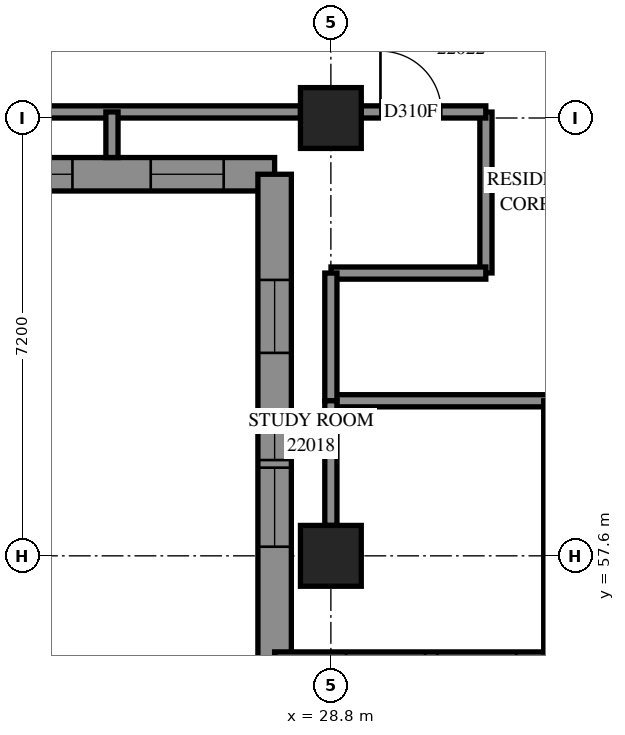
"""IFC4 building model, lengths in metres.
Left out: names, types, materials, properties, quantities, classifications, styles, units other than length and angle.
Written with IfcOpenShell. Run it as: python <this file> out.ifc"""

import sys

from ifc_helpers import new_model, si_unit, direction, frame, frame_2d, origin, origin_2d, place, context, subcontext, project, spatial, polyline, rectangle, outline, extrude, element, fill, save


model = new_model("IFC4")
c1 = context("Model", 3, precision=1e-05, world=origin(), true_north=direction((0.0, 1.0)))
c2 = subcontext(c1, "Body", "Model", "MODEL_VIEW")
j1 = project(units=[si_unit("LENGTHUNIT", "METRE"), si_unit("PLANEANGLEUNIT", "RADIAN")], contexts=[c1])
p1 = place(None, origin())
s1 = spatial("IfcSite", under=j1, at=p1, CompositionType="ELEMENT")
p2 = place(p1, origin())
s2 = spatial("IfcBuilding", under=s1, at=p2, CompositionType="ELEMENT")
p3 = place(p2, frame((0.0, 0.0, 84.6)))
s3 = spatial("IfcBuildingStorey", under=s2, at=p3, CompositionType="ELEMENT", Elevation=84.6)
for number, where, z_axis, x_axis in (
    (1, (28.8, 57.6, 0.0), (0.0, 0.0, 1.0), (1.0, 0.0, 0.0)),
    (2, (28.8, 64.8, 0.0), (0.0, 0.0, 1.0), (1.0, 0.0, 0.0)),
):
    element("IfcColumn", number, at=place(p3, frame(where, z_axis=z_axis, x_axis=x_axis)), inside=s3, PredefinedType="COLUMN", context=c2, shape_type="SweptSolid", body=[
        extrude(rectangle(XDim=1.0, YDim=1.0, at=origin_2d()), origin(), (0.0, 0.0, 1.0), 3.1),
    ])
p4 = place(p3, frame((19.745, 63.875, 0.0), z_axis=(0.0, 0.0, 1.0), x_axis=(1.0, 0.0, 0.0)))
e3 = element("IfcWall", 3, at=p4, inside=s3, PredefinedType="SOLIDWALL", context=c2, shape_type="SweptSolid", body=[
    extrude(outline(polyline([(-0.275, -0.275), (7.855, -0.275), (8.405, 0.275), (0.275, 0.275), (-0.275, -0.275)])), origin(), (0.0, 0.0, 1.0), 3.1),
])
p5 = place(p4, frame((2.005, 0.0, 0.5)))
e4 = element("IfcOpeningElement", 4, at=p5, cuts=e3, PredefinedType="OPENING", context=c2, shape_type="SweptSolid", body=[
    extrude(rectangle(XDim=1.3, YDim=2.45, at=frame_2d((0.65, 1.225))), frame((0.0, 0.285, 0.0), z_axis=(0.0, -1.0, 0.0), x_axis=(1.0, 0.0, 0.0)), (0.0, 0.0, 1.0), 0.57),
])
p6 = place(p4, frame((3.505, 0.0, 0.5)))
e5 = element("IfcOpeningElement", 5, at=p6, cuts=e3, PredefinedType="OPENING", context=c2, shape_type="SweptSolid", body=[
    extrude(rectangle(XDim=1.3, YDim=2.45, at=frame_2d((0.65, 1.225))), frame((0.0, 0.285, 0.0), z_axis=(0.0, -1.0, 0.0), x_axis=(1.0, 0.0, 0.0)), (0.0, 0.0, 1.0), 0.57),
])
p7 = place(p4, frame((6.093, 0.0, 0.5)))
e6 = element("IfcOpeningElement", 6, at=p7, cuts=e3, PredefinedType="OPENING", context=c2, shape_type="SweptSolid", body=[
    extrude(rectangle(XDim=1.2, YDim=2.45, at=frame_2d((0.6, 1.225))), frame((0.0, 0.285, 0.0), z_axis=(0.0, -1.0, 0.0), x_axis=(1.0, 0.0, 0.0)), (0.0, 0.0, 1.0), 0.57),
])
p8 = place(p3, frame((27.875, 63.875, 0.0), z_axis=(0.0, 0.0, 1.0), x_axis=(0.0, -1.0, 0.0)))
e7 = element("IfcWall", 7, at=p8, inside=s3, PredefinedType="SOLIDWALL", context=c2, shape_type="SweptSolid", body=[
    extrude(outline(polyline([(0.275, -0.275), (8.405, -0.275), (7.855, 0.275), (-0.275, 0.275), (0.275, -0.275)])), origin(), (0.0, 0.0, 1.0), 3.1),
])
p9 = place(p8, frame((4.825, 0.0, 0.5)))
e8 = element("IfcOpeningElement", 8, at=p9, cuts=e7, PredefinedType="OPENING", context=c2, shape_type="SweptSolid", body=[
    extrude(rectangle(XDim=1.3, YDim=2.45, at=frame_2d((0.65, 1.225))), frame((0.0, 0.285, 0.0), z_axis=(0.0, -1.0, 0.0), x_axis=(1.0, 0.0, 0.0)), (0.0, 0.0, 1.0), 0.57),
])
p10 = place(p8, frame((1.738, 0.0, 0.5)))
e9 = element("IfcOpeningElement", 9, at=p10, cuts=e7, PredefinedType="OPENING", context=c2, shape_type="SweptSolid", body=[
    extrude(rectangle(XDim=1.2, YDim=2.45, at=frame_2d((0.6, 1.225))), frame((0.0, 0.285, 0.0), z_axis=(0.0, -1.0, 0.0), x_axis=(1.0, 0.0, 0.0)), (0.0, 0.0, 1.0), 0.57),
])
p11 = place(p8, frame((3.9, 0.0, 0.45)))
e10 = element("IfcOpeningElement", 10, at=p11, cuts=e7, PredefinedType="OPENING", context=c2, shape_type="SweptSolid", body=[
    extrude(rectangle(XDim=0.8, YDim=2.5, at=frame_2d((0.4, 1.25))), frame((0.0, 0.285, 0.0), z_axis=(0.0, -1.0, 0.0), x_axis=(1.0, 0.0, 0.0)), (0.0, 0.0, 1.0), 0.57),
])
p12 = place(p3, frame((27.875, 55.745, 0.0), z_axis=(0.0, 0.0, 1.0), x_axis=(1.0, 0.0, 0.0)))
e11 = element("IfcWall", 11, at=p12, inside=s3, PredefinedType="SOLIDWALL", context=c2, shape_type="SweptSolid", body=[
    extrude(outline(polyline([(-0.275, -0.275), (14.125, -0.275), (14.675, 0.275), (0.275, 0.275), (-0.275, -0.275)])), origin(), (0.0, 0.0, 1.0), 3.1),
])
p13 = place(p12, frame((1.175, 0.0, 0.5)))
e12 = element("IfcOpeningElement", 12, at=p13, cuts=e11, PredefinedType="OPENING", context=c2, shape_type="SweptSolid", body=[
    extrude(rectangle(XDim=1.3, YDim=2.45, at=frame_2d((0.65, 1.225))), frame((0.0, 0.285, 0.0), z_axis=(0.0, -1.0, 0.0), x_axis=(1.0, 0.0, 0.0)), (0.0, 0.0, 1.0), 0.57),
])
p14 = place(p12, frame((2.675, 0.0, 0.5)))
e13 = element("IfcOpeningElement", 13, at=p14, cuts=e11, PredefinedType="OPENING", context=c2, shape_type="SweptSolid", body=[
    extrude(rectangle(XDim=1.3, YDim=2.45, at=frame_2d((0.65, 1.225))), frame((0.0, 0.285, 0.0), z_axis=(0.0, -1.0, 0.0), x_axis=(1.0, 0.0, 0.0)), (0.0, 0.0, 1.0), 0.57),
])
p15 = place(p12, frame((4.925, 0.0, 0.5)))
e14 = element("IfcOpeningElement", 14, at=p15, cuts=e11, PredefinedType="OPENING", context=c2, shape_type="SweptSolid", body=[
    extrude(rectangle(XDim=1.3, YDim=2.45, at=frame_2d((0.65, 1.225))), frame((0.0, 0.285, 0.0), z_axis=(0.0, -1.0, 0.0), x_axis=(1.0, 0.0, 0.0)), (0.0, 0.0, 1.0), 0.57),
])
p16 = place(p12, frame((6.425, 0.0, 0.5)))
e15 = element("IfcOpeningElement", 15, at=p16, cuts=e11, PredefinedType="OPENING", context=c2, shape_type="SweptSolid", body=[
    extrude(rectangle(XDim=1.3, YDim=2.45, at=frame_2d((0.65, 1.225))), frame((0.0, 0.285, 0.0), z_axis=(0.0, -1.0, 0.0), x_axis=(1.0, 0.0, 0.0)), (0.0, 0.0, 1.0), 0.57),
])
p17 = place(p12, frame((8.275, 0.0, 0.5)))
e16 = element("IfcOpeningElement", 16, at=p17, cuts=e11, PredefinedType="OPENING", context=c2, shape_type="SweptSolid", body=[
    extrude(rectangle(XDim=1.3, YDim=2.45, at=frame_2d((0.65, 1.225))), frame((0.0, 0.285, 0.0), z_axis=(0.0, -1.0, 0.0), x_axis=(1.0, 0.0, 0.0)), (0.0, 0.0, 1.0), 0.57),
])
p18 = place(p12, frame((9.775, 0.0, 0.5)))
e17 = element("IfcOpeningElement", 17, at=p18, cuts=e11, PredefinedType="OPENING", context=c2, shape_type="SweptSolid", body=[
    extrude(rectangle(XDim=1.3, YDim=2.45, at=frame_2d((0.65, 1.225))), frame((0.0, 0.285, 0.0), z_axis=(0.0, -1.0, 0.0), x_axis=(1.0, 0.0, 0.0)), (0.0, 0.0, 1.0), 0.57),
])
p19 = place(p12, frame((12.363, 0.0, 0.5)))
e18 = element("IfcOpeningElement", 18, at=p19, cuts=e11, PredefinedType="OPENING", context=c2, shape_type="SweptSolid", body=[
    extrude(rectangle(XDim=1.2, YDim=2.45, at=frame_2d((0.6, 1.225))), frame((0.0, 0.285, 0.0), z_axis=(0.0, -1.0, 0.0), x_axis=(1.0, 0.0, 0.0)), (0.0, 0.0, 1.0), 0.57),
])
p20 = place(p3, frame((28.8, 60.15, 0.0), z_axis=(0.0, 0.0, 1.0), x_axis=(1.0, 0.0, 0.0)))
e19 = element("IfcWall", 19, at=p20, inside=s3, PredefinedType="PARTITIONING", context=c2, shape_type="SweptSolid", body=[
    extrude(rectangle(XDim=24.15, YDim=0.2, at=frame_2d((12.075, 0.0))), origin(), (0.0, 0.0, 1.0), 3.1),
])
p21 = place(p20, frame((11.325, 0.0, 0.0)))
e20 = element("IfcOpeningElement", 20, at=p21, cuts=e19, PredefinedType="OPENING", context=c2, shape_type="SweptSolid", body=[
    extrude(rectangle(XDim=1.0, YDim=2.1, at=frame_2d((0.5, 1.05))), frame((0.0, 0.11, 0.0), z_axis=(0.0, -1.0, 0.0), x_axis=(1.0, 0.0, 0.0)), (0.0, 0.0, 1.0), 0.22),
])
p22 = place(p20, frame((14.8, 0.0, 0.0)))
e21 = element("IfcOpeningElement", 21, at=p22, cuts=e19, PredefinedType="OPENING", context=c2, shape_type="SweptSolid", body=[
    extrude(rectangle(XDim=0.9, YDim=2.1, at=frame_2d((0.45, 1.05))), frame((0.0, 0.11, 0.0), z_axis=(0.0, -1.0, 0.0), x_axis=(1.0, 0.0, 0.0)), (0.0, 0.0, 1.0), 0.22),
])
p23 = place(p20, frame((18.508, 0.0, 0.0)))
e22 = element("IfcOpeningElement", 22, at=p23, cuts=e19, PredefinedType="OPENING", context=c2, shape_type="SweptSolid", body=[
    extrude(rectangle(XDim=1.0, YDim=2.1, at=frame_2d((0.5, 1.05))), frame((0.0, 0.11, 0.0), z_axis=(0.0, -1.0, 0.0), x_axis=(1.0, 0.0, 0.0)), (0.0, 0.0, 1.0), 0.22),
])
p24 = place(p20, frame((22.882, 0.0, 0.0)))
e23 = element("IfcOpeningElement", 23, at=p24, cuts=e19, PredefinedType="OPENING", context=c2, shape_type="SweptSolid", body=[
    extrude(rectangle(XDim=1.0, YDim=2.1, at=frame_2d((0.5, 1.05))), frame((0.0, 0.11, 0.0), z_axis=(0.0, -1.0, 0.0), x_axis=(1.0, 0.0, 0.0)), (0.0, 0.0, 1.0), 0.22),
])
p25 = place(p3, frame((22.1, 64.9, 0.0), z_axis=(0.0, 0.0, 1.0), x_axis=(1.0, 0.0, 0.0)))
e24 = element("IfcWall", 24, at=p25, inside=s3, PredefinedType="PARTITIONING", context=c2, shape_type="SweptSolid", body=[
    extrude(rectangle(XDim=6.2, YDim=0.2, at=frame_2d((3.1, 0.0))), origin(), (0.0, 0.0, 1.0), 2.6),
])
p26 = place(p3, frame((32.4, 56.02, 0.0), z_axis=(0.0, 0.0, 1.0), x_axis=(0.0, 1.0, 0.0)))
e25 = element("IfcWall", 25, at=p26, inside=s3, PredefinedType="PARTITIONING", context=c2, shape_type="SweptSolid", body=[
    extrude(rectangle(XDim=4.13, YDim=0.2, at=frame_2d((2.065, 0.0))), origin(), (0.0, 0.0, 1.0), 3.1),
])
p27 = place(p3, frame((31.35, 62.252, 0.0), z_axis=(0.0, 0.0, 1.0), x_axis=(0.0, 1.0, 0.0)))
e26 = element("IfcWall", 26, at=p27, inside=s3, PredefinedType="PARTITIONING", context=c2, shape_type="SweptSolid", body=[
    extrude(rectangle(XDim=2.646, YDim=0.2, at=frame_2d((1.323, 0.0))), origin(), (0.0, 0.0, 1.0), 3.1),
])
p28 = place(p3, frame((28.802, 62.25, 0.0), z_axis=(0.0, 0.0, 1.0), x_axis=(1.0, 0.0, 0.0)))
e27 = element("IfcWall", 27, at=p28, inside=s3, PredefinedType="PARTITIONING", context=c2, shape_type="SweptSolid", body=[
    extrude(rectangle(XDim=2.546, YDim=0.2, at=frame_2d((1.273, 0.0))), origin(), (0.0, 0.0, 1.0), 3.1),
])
p29 = place(p3, frame((28.8, 60.15, 0.0), z_axis=(0.0, 0.0, 1.0), x_axis=(0.0, 1.0, 0.0)))
e28 = element("IfcWall", 28, at=p29, inside=s3, PredefinedType="PARTITIONING", context=c2, shape_type="SweptSolid", body=[
    extrude(rectangle(XDim=2.1, YDim=0.2, at=frame_2d((1.05, 0.0))), origin(), (0.0, 0.0, 1.0), 2.6),
])
p30 = place(p3, frame((28.8, 58.1, 0.0), z_axis=(0.0, 0.0, 1.0), x_axis=(0.0, 1.0, 0.0)))
e29 = element("IfcWall", 29, at=p30, inside=s3, PredefinedType="PARTITIONING", context=c2, shape_type="SweptSolid", body=[
    extrude(rectangle(XDim=2.05, YDim=0.2, at=frame_2d((1.025, 0.0))), origin(), (0.0, 0.0, 1.0), 2.6),
])
p31 = place(p3, frame((29.3, 64.9, 0.0), z_axis=(0.0, 0.0, 1.0), x_axis=(1.0, 0.0, 0.0)))
e30 = element("IfcWall", 30, at=p31, inside=s3, PredefinedType="PARTITIONING", context=c2, shape_type="SweptSolid", body=[
    extrude(rectangle(XDim=2.048, YDim=0.2, at=frame_2d((1.024, 0.0))), origin(), (0.0, 0.0, 1.0), 3.1),
])
p32 = place(p31, frame((0.316, 0.0, 0.0)))
e31 = element("IfcOpeningElement", 31, at=p32, cuts=e30, PredefinedType="OPENING", context=c2, shape_type="SweptSolid", body=[
    extrude(rectangle(XDim=1.0, YDim=2.1, at=frame_2d((0.5, 1.05))), frame((0.0, 0.11, 0.0), z_axis=(0.0, -1.0, 0.0), x_axis=(1.0, 0.0, 0.0)), (0.0, 0.0, 1.0), 0.22),
])
p33 = place(p3, frame((25.2, 64.15, 0.0), z_axis=(0.0, 0.0, 1.0), x_axis=(0.0, 1.0, 0.0)))
e32 = element("IfcWall", 32, at=p33, inside=s3, PredefinedType="PARTITIONING", context=c2, shape_type="SweptSolid", body=[
    extrude(rectangle(XDim=0.75, YDim=0.2, at=frame_2d((0.375, 0.0))), origin(), (0.0, 0.0, 1.0), 3.1),
])
p34 = place(p6, origin())
e33 = element("IfcWindow", 33, at=p34, inside=s3, PartitioningType="SINGLE_PANEL", PredefinedType="WINDOW", context=c2, shape_type="SweptSolid", body=[
    extrude(rectangle(XDim=1.3, YDim=2.45, at=frame_2d((0.65, 1.225))), frame((0.0, 0.155, 0.0), z_axis=(0.0, -1.0, 0.0), x_axis=(1.0, 0.0, 0.0)), (0.0, 0.0, 1.0), 0.06),
])
fill(e5, e33)
p35 = place(p7, origin())
e34 = element("IfcWindow", 34, at=p35, inside=s3, PartitioningType="SINGLE_PANEL", PredefinedType="WINDOW", context=c2, shape_type="SweptSolid", body=[
    extrude(rectangle(XDim=1.2, YDim=2.45, at=frame_2d((0.6, 1.225))), frame((0.0, 0.155, 0.0), z_axis=(0.0, -1.0, 0.0), x_axis=(1.0, 0.0, 0.0)), (0.0, 0.0, 1.0), 0.06),
])
fill(e6, e34)
p36 = place(p9, origin())
e35 = element("IfcWindow", 35, at=p36, inside=s3, PartitioningType="SINGLE_PANEL", PredefinedType="WINDOW", context=c2, shape_type="SweptSolid", body=[
    extrude(rectangle(XDim=1.3, YDim=2.45, at=frame_2d((0.65, 1.225))), frame((0.0, 0.155, 0.0), z_axis=(0.0, -1.0, 0.0), x_axis=(1.0, 0.0, 0.0)), (0.0, 0.0, 1.0), 0.06),
])
fill(e8, e35)
p37 = place(p10, origin())
e36 = element("IfcWindow", 36, at=p37, inside=s3, PartitioningType="SINGLE_PANEL", PredefinedType="WINDOW", context=c2, shape_type="SweptSolid", body=[
    extrude(rectangle(XDim=1.2, YDim=2.45, at=frame_2d((0.6, 1.225))), frame((0.0, 0.155, 0.0), z_axis=(0.0, -1.0, 0.0), x_axis=(1.0, 0.0, 0.0)), (0.0, 0.0, 1.0), 0.06),
])
fill(e9, e36)
p38 = place(p32, origin())
e37 = element("IfcDoor", 37, at=p38, inside=s3, OperationType="SINGLE_SWING_RIGHT", PredefinedType="DOOR", context=c2, shape_type="SweptSolid", body=[
    extrude(rectangle(XDim=1.0, YDim=2.1, at=frame_2d((0.5, 1.05))), frame((0.0, 0.025, 0.0), z_axis=(0.0, -1.0, 0.0), x_axis=(1.0, 0.0, 0.0)), (0.0, 0.0, 1.0), 0.05),
])
fill(e31, e37)
p39 = place(p11, origin())
e38 = element("IfcWindow", 38, at=p39, inside=s3, PartitioningType="SINGLE_PANEL", PredefinedType="WINDOW", context=c2, shape_type="SweptSolid", body=[
    extrude(rectangle(XDim=0.8, YDim=2.5, at=frame_2d((0.4, 1.25))), frame((0.0, 0.155, 0.0), z_axis=(0.0, -1.0, 0.0), x_axis=(1.0, 0.0, 0.0)), (0.0, 0.0, 1.0), 0.06),
])
fill(e10, e38)
save(model, sys.argv[1])
